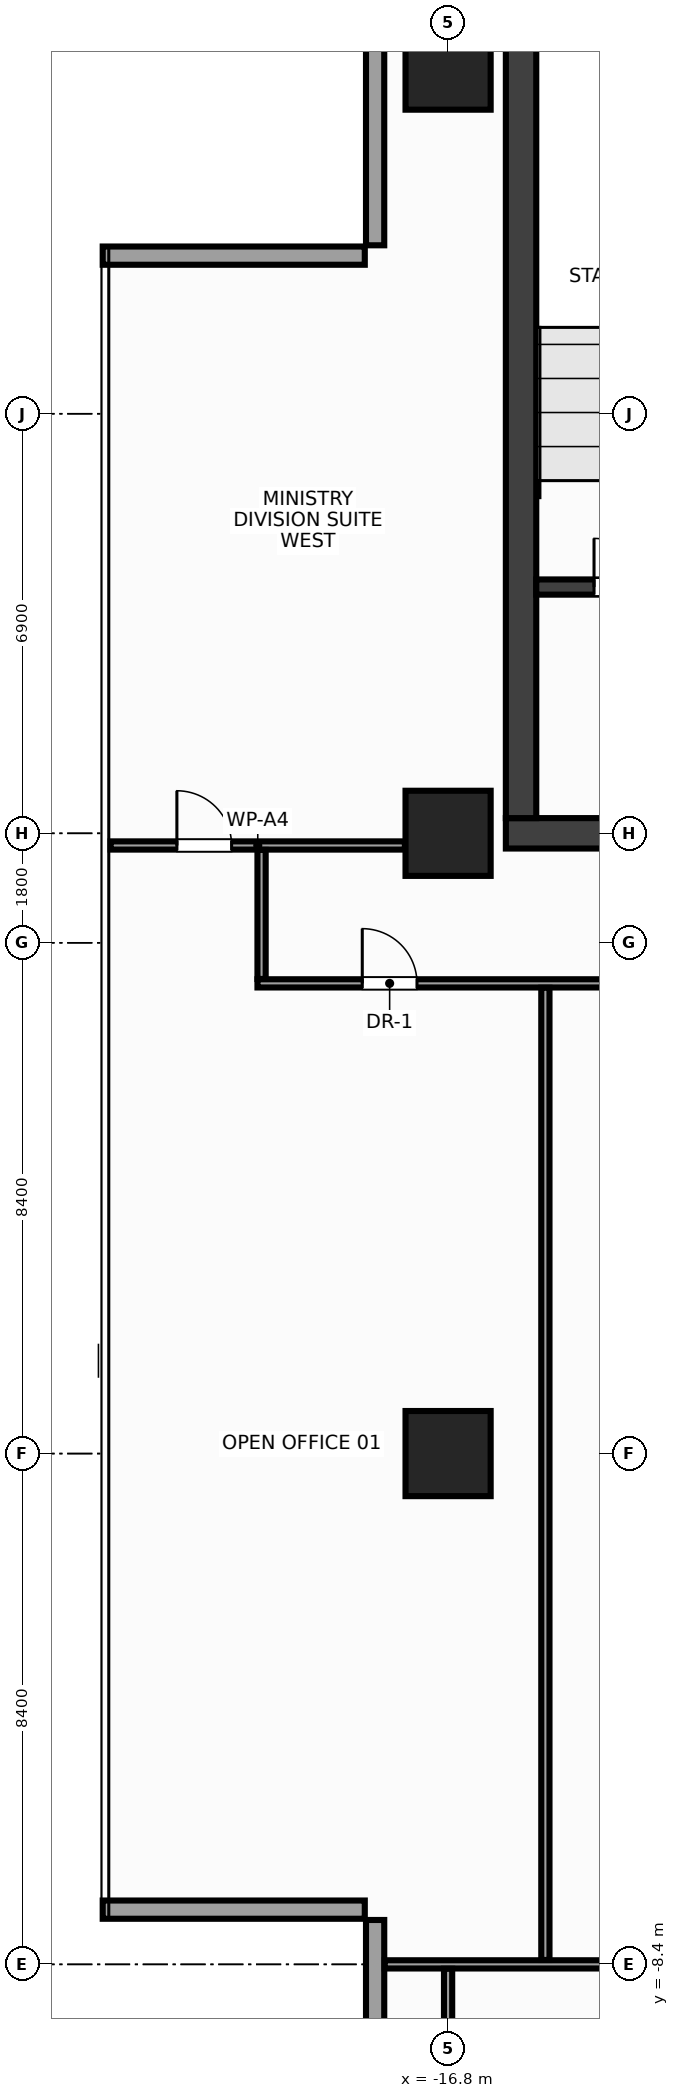
"""IFC4 building model, lengths in metres.
Left out: names, types, materials, properties, quantities, classifications, styles, units other than length and angle.
Written with IfcOpenShell. Run it as: python <this file> out.ifc"""

import sys

from ifc_helpers import new_model, si_unit, direction, frame, frame_2d, origin, origin_2d, place, context, subcontext, project, spatial, rectangle, extrude, source, transform, mapped, element, fill, save


model = new_model("IFC4")
c1 = context("Model", 3, precision=1e-05, world=origin(), true_north=direction((0.0, 1.0)))
c2 = subcontext(c1, "Body", "Model", "MODEL_VIEW")
j1 = project(units=[si_unit("LENGTHUNIT", "METRE"), si_unit("PLANEANGLEUNIT", "RADIAN")], contexts=[c1])
p1 = place(None, origin())
s1 = spatial("IfcSite", under=j1, at=p1, CompositionType="ELEMENT")
p2 = place(p1, origin())
s2 = spatial("IfcBuilding", under=s1, at=p2, CompositionType="ELEMENT")
p3 = place(p2, frame((0.0, 0.0, 239.6)))
s3 = spatial("IfcBuildingStorey", under=s2, at=p3, CompositionType="ELEMENT", Elevation=239.6)
m1 = source(origin(), c2, "Body", "SweptSolid", [
    extrude(rectangle(XDim=31.7, YDim=0.5, at=frame_2d((15.85, 0.0))), origin(), (0.0, 0.0, 1.0), 3.6),
])
p4 = place(p3, frame((-15.85, 10.2, 0.0), z_axis=(0.0, 0.0, 1.0), x_axis=(1.0, 0.0, 0.0)))
e1 = element("IfcWall", 1, at=p4, inside=s3, PredefinedType="SHEAR", context=c2, shape_type="MappedRepresentation", body=[
    mapped(m1, transform((0.0, 0.0, 0.0), x_axis=(1.0, 0.0, 0.0), y_axis=(0.0, 1.0, 0.0), z_axis=(0.0, 0.0, 1.0), scale=1.0)),
])
p5 = place(p4, frame((1.7, 0.0, 0.0)))
e2 = element("IfcOpeningElement", 2, at=p5, cuts=e1, PredefinedType="OPENING", context=c2, shape_type="SweptSolid", body=[
    extrude(rectangle(XDim=1.6, YDim=2.15, at=frame_2d((0.8, 1.075))), frame((0.0, 0.262, 0.0), z_axis=(0.0, -1.0, 0.0), x_axis=(1.0, 0.0, 0.0)), (0.0, 0.0, 1.0), 0.524),
])
p6 = place(p4, frame((28.4, 0.0, 0.0)))
e3 = element("IfcOpeningElement", 3, at=p6, cuts=e1, PredefinedType="OPENING", context=c2, shape_type="SweptSolid", body=[
    extrude(rectangle(XDim=1.6, YDim=2.15, at=frame_2d((0.8, 1.075))), frame((0.0, 0.262, 0.0), z_axis=(0.0, -1.0, 0.0), x_axis=(1.0, 0.0, 0.0)), (0.0, 0.0, 1.0), 0.524),
])
p7 = place(p4, frame((15.1, 0.0, 0.0)))
e4 = element("IfcOpeningElement", 4, at=p7, cuts=e1, PredefinedType="OPENING", context=c2, shape_type="SweptSolid", body=[
    extrude(rectangle(XDim=1.5, YDim=2.2, at=frame_2d((0.75, 1.1))), frame((0.0, 0.262, 0.0), z_axis=(0.0, -1.0, 0.0), x_axis=(1.0, 0.0, 0.0)), (0.0, 0.0, 1.0), 0.524),
])
m2 = source(origin(), c2, "Body", "SweptSolid", [
    extrude(rectangle(XDim=13.1, YDim=0.5, at=frame_2d((6.55, 0.0))), origin(), (0.0, 0.0, 1.0), 3.6),
])
p8 = place(p3, frame((-15.6, 10.45, 0.0), z_axis=(0.0, 0.0, 1.0), x_axis=(0.0, 1.0, 0.0)))
e5 = element("IfcWall", 5, at=p8, inside=s3, PredefinedType="SHEAR", context=c2, shape_type="MappedRepresentation", body=[
    mapped(m2, transform((0.0, 0.0, 0.0), x_axis=(1.0, 0.0, 0.0), y_axis=(0.0, 1.0, 0.0), z_axis=(0.0, 0.0, 1.0), scale=1.0)),
])
m3 = source(origin(), c2, "Body", "SweptSolid", [
    extrude(rectangle(XDim=3.705, YDim=0.25, at=frame_2d((1.853, 0.0))), origin(), (0.0, 0.0, 1.0), 3.6),
])
p9 = place(p3, frame((-15.35, 14.25, 0.0), z_axis=(0.0, 0.0, 1.0), x_axis=(1.0, 0.0, 0.0)))
e6 = element("IfcWall", 6, at=p9, inside=s3, PredefinedType="SHEAR", context=c2, shape_type="MappedRepresentation", body=[
    mapped(m3, transform((0.0, 0.0, 0.0), x_axis=(1.0, 0.0, 0.0), y_axis=(0.0, 1.0, 0.0), z_axis=(0.0, 0.0, 1.0), scale=1.0)),
])
p10 = place(p9, frame((0.95, 0.0, 0.0)))
e7 = element("IfcOpeningElement", 7, at=p10, cuts=e6, PredefinedType="OPENING", context=c2, shape_type="SweptSolid", body=[
    extrude(rectangle(XDim=1.6, YDim=2.15, at=frame_2d((0.8, 1.075))), frame((0.0, 0.137, 0.0), z_axis=(0.0, -1.0, 0.0), x_axis=(1.0, 0.0, 0.0)), (0.0, 0.0, 1.0), 0.274),
])
m4 = source(origin(), c2, "Body", "SweptSolid", [
    extrude(rectangle(XDim=1.4, YDim=1.4, at=origin_2d()), origin(), (0.0, 0.0, 1.0), 3.6),
])
for number, where, z_axis, x_axis in (
    (8, (-16.8, 0.0, 0.0), (0.0, 0.0, 1.0), (1.0, 0.0, 0.0)),
    (9, (-16.8, 10.2, 0.0), (0.0, 0.0, 1.0), (1.0, 0.0, 0.0)),
    (10, (-16.8, 22.8, 0.0), (0.0, 0.0, 1.0), (1.0, 0.0, 0.0)),
):
    element("IfcColumn", number, at=place(p3, frame(where, z_axis=z_axis, x_axis=x_axis)), inside=s3, PredefinedType="COLUMN", context=c2, shape_type="MappedRepresentation", body=[
        mapped(m4, transform((0.0, 0.0, 0.0), x_axis=(1.0, 0.0, 0.0), y_axis=(0.0, 1.0, 0.0), z_axis=(0.0, 0.0, 1.0), scale=1.0)),
    ])
m5 = source(origin(), c2, "Body", "SweptSolid", [
    extrude(rectangle(XDim=4.31, YDim=0.3, at=frame_2d((2.155, 0.0))), origin(), (0.0, 0.0, 1.0), 2.75),
])
p11 = place(p3, frame((-18.0, 24.18, 0.0), z_axis=(0.0, 0.0, 1.0), x_axis=(0.0, -1.0, 0.0)))
e11 = element("IfcWall", 11, at=p11, inside=s3, PredefinedType="STANDARD", context=c2, shape_type="MappedRepresentation", body=[
    mapped(m5, transform((0.0, 0.0, 0.0), x_axis=(1.0, 0.0, 0.0), y_axis=(0.0, 1.0, 0.0), z_axis=(0.0, 0.0, 1.0), scale=1.0)),
])
m6 = source(origin(), c2, "Body", "SweptSolid", [
    extrude(rectangle(XDim=4.31, YDim=0.3, at=frame_2d((2.155, 0.0))), origin(), (0.0, 0.0, 1.0), 2.75),
])
for number, where, z_axis, x_axis in (
    (12, (-18.17, 19.7, 0.0), (0.0, 0.0, 1.0), (-1.0, 0.0, 0.0)),
    (13, (-22.48, -7.5, 0.0), (0.0, 0.0, 1.0), (1.0, 0.0, 0.0)),
    (14, (-18.0, -7.67, 0.0), (0.0, 0.0, 1.0), (0.0, -1.0, 0.0)),
):
    element("IfcWall", number, at=place(p3, frame(where, z_axis=z_axis, x_axis=x_axis)), inside=s3, PredefinedType="STANDARD", context=c2, shape_type="MappedRepresentation", body=[
        mapped(m6, transform((0.0, 0.0, 0.0), x_axis=(1.0, 0.0, 0.0), y_axis=(0.0, 1.0, 0.0), z_axis=(0.0, 0.0, 1.0), scale=1.0)),
    ])
m7 = source(origin(), c2, "Body", "SweptSolid", [
    extrude(rectangle(XDim=4.84, YDim=0.135, at=frame_2d((2.42, 0.0))), origin(), (0.0, 0.0, 1.0), 3.37),
])
p12 = place(p3, frame((-22.35, 10.0, 0.0), z_axis=(0.0, 0.0, 1.0), x_axis=(1.0, 0.0, 0.0)))
e15 = element("IfcWall", 15, at=p12, inside=s3, PredefinedType="PARTITIONING", context=c2, shape_type="MappedRepresentation", body=[
    mapped(m7, transform((0.0, 0.0, 0.0), x_axis=(1.0, 0.0, 0.0), y_axis=(0.0, 1.0, 0.0), z_axis=(0.0, 0.0, 1.0), scale=1.0)),
])
p13 = place(p12, frame((1.09, 0.0, 0.0)))
e16 = element("IfcOpeningElement", 16, at=p13, cuts=e15, PredefinedType="OPENING", context=c2, shape_type="SweptSolid", body=[
    extrude(rectangle(XDim=0.9, YDim=2.15, at=frame_2d((0.45, 1.075))), frame((0.0, 0.08, 0.0), z_axis=(0.0, -1.0, 0.0), x_axis=(1.0, 0.0, 0.0)), (0.0, 0.0, 1.0), 0.159),
])
m8 = source(origin(), c2, "Body", "SweptSolid", [
    extrude(rectangle(XDim=15.6, YDim=0.135, at=frame_2d((7.8, 0.0))), origin(), (0.0, 0.0, 1.0), 2.755),
])
p14 = place(p3, frame((-19.935, 7.732, 0.0), z_axis=(0.0, 0.0, 1.0), x_axis=(1.0, 0.0, 0.0)))
e17 = element("IfcWall", 17, at=p14, inside=s3, PredefinedType="PARTITIONING", context=c2, shape_type="MappedRepresentation", body=[
    mapped(m8, transform((0.0, 0.0, 0.0), x_axis=(1.0, 0.0, 0.0), y_axis=(0.0, 1.0, 0.0), z_axis=(0.0, 0.0, 1.0), scale=1.0)),
])
p15 = place(p14, frame((1.724, 0.0, 0.0)))
e18 = element("IfcOpeningElement", 18, at=p15, cuts=e17, PredefinedType="OPENING", context=c2, shape_type="SweptSolid", body=[
    extrude(rectangle(XDim=0.9, YDim=2.15, at=frame_2d((0.45, 1.075))), frame((0.0, 0.08, 0.0), z_axis=(0.0, -1.0, 0.0), x_axis=(1.0, 0.0, 0.0)), (0.0, 0.0, 1.0), 0.159),
])
p16 = place(p14, frame((9.691, 0.0, 0.0)))
e19 = element("IfcOpeningElement", 19, at=p16, cuts=e17, PredefinedType="OPENING", context=c2, shape_type="SweptSolid", body=[
    extrude(rectangle(XDim=0.9, YDim=2.15, at=frame_2d((0.45, 1.075))), frame((0.0, 0.08, 0.0), z_axis=(0.0, -1.0, 0.0), x_axis=(1.0, 0.0, 0.0)), (0.0, 0.0, 1.0), 0.159),
])
m9 = source(origin(), c2, "Body", "SweptSolid", [
    extrude(rectangle(XDim=2.123, YDim=0.135, at=frame_2d((1.061, 0.0))), origin(), (0.0, 0.0, 1.0), 3.37),
])
p17 = place(p3, frame((-19.867, 7.805, 0.0), z_axis=(0.0, 0.0, 1.0), x_axis=(0.0, 1.0, 0.0)))
e20 = element("IfcWall", 20, at=p17, inside=s3, PredefinedType="PARTITIONING", context=c2, shape_type="MappedRepresentation", body=[
    mapped(m9, transform((0.0, 0.0, 0.0), x_axis=(1.0, 0.0, 0.0), y_axis=(0.0, 1.0, 0.0), z_axis=(0.0, 0.0, 1.0), scale=1.0)),
])
m10 = source(origin(), c2, "Body", "SweptSolid", [
    extrude(rectangle(XDim=35.684, YDim=0.135, at=frame_2d((17.842, 0.0))), origin(), (0.0, 0.0, 1.0), 2.755),
])
p18 = place(p3, frame((-17.842, -8.4, 0.0), z_axis=(0.0, 0.0, 1.0), x_axis=(1.0, 0.0, 0.0)))
e21 = element("IfcWall", 21, at=p18, inside=s3, PredefinedType="PARTITIONING", context=c2, shape_type="MappedRepresentation", body=[
    mapped(m10, transform((0.0, 0.0, 0.0), x_axis=(1.0, 0.0, 0.0), y_axis=(0.0, 1.0, 0.0), z_axis=(0.0, 0.0, 1.0), scale=1.0)),
])
p19 = place(p18, frame((8.892, 0.0, 0.0)))
e22 = element("IfcOpeningElement", 22, at=p19, cuts=e21, PredefinedType="OPENING", context=c2, shape_type="SweptSolid", body=[
    extrude(rectangle(XDim=0.9, YDim=2.15, at=frame_2d((0.45, 1.075))), frame((0.0, 0.08, 0.0), z_axis=(0.0, -1.0, 0.0), x_axis=(1.0, 0.0, 0.0)), (0.0, 0.0, 1.0), 0.159),
])
p20 = place(p18, frame((33.487, 0.0, 0.0)))
e23 = element("IfcOpeningElement", 23, at=p20, cuts=e21, PredefinedType="OPENING", context=c2, shape_type="SweptSolid", body=[
    extrude(rectangle(XDim=0.9, YDim=2.15, at=frame_2d((0.45, 1.075))), frame((0.0, 0.08, 0.0), z_axis=(0.0, -1.0, 0.0), x_axis=(1.0, 0.0, 0.0)), (0.0, 0.0, 1.0), 0.159),
])
p21 = place(p18, frame((4.092, 0.0, 0.0)))
e24 = element("IfcOpeningElement", 24, at=p21, cuts=e21, PredefinedType="OPENING", context=c2, shape_type="SweptSolid", body=[
    extrude(rectangle(XDim=0.9, YDim=2.15, at=frame_2d((0.45, 1.075))), frame((0.0, 0.08, 0.0), z_axis=(0.0, -1.0, 0.0), x_axis=(1.0, 0.0, 0.0)), (0.0, 0.0, 1.0), 0.159),
])
p22 = place(p18, frame((18.692, 0.0, 0.0)))
e25 = element("IfcOpeningElement", 25, at=p22, cuts=e21, PredefinedType="OPENING", context=c2, shape_type="SweptSolid", body=[
    extrude(rectangle(XDim=0.9, YDim=2.15, at=frame_2d((0.45, 1.075))), frame((0.0, 0.08, 0.0), z_axis=(0.0, -1.0, 0.0), x_axis=(1.0, 0.0, 0.0)), (0.0, 0.0, 1.0), 0.159),
])
p23 = place(p18, frame((25.292, 0.0, 0.0)))
e26 = element("IfcOpeningElement", 26, at=p23, cuts=e21, PredefinedType="OPENING", context=c2, shape_type="SweptSolid", body=[
    extrude(rectangle(XDim=0.9, YDim=2.15, at=frame_2d((0.45, 1.075))), frame((0.0, 0.08, 0.0), z_axis=(0.0, -1.0, 0.0), x_axis=(1.0, 0.0, 0.0)), (0.0, 0.0, 1.0), 0.159),
])
m11 = source(origin(), c2, "Body", "SweptSolid", [
    extrude(rectangle(XDim=15.987, YDim=0.135, at=frame_2d((7.994, 0.0))), origin(), (0.0, 0.0, 1.0), 2.655),
])
p24 = place(p3, frame((-15.2, -8.327, 0.0), z_axis=(0.0, 0.0, 1.0), x_axis=(0.0, 1.0, 0.0)))
e27 = element("IfcWall", 27, at=p24, inside=s3, PredefinedType="PARTITIONING", context=c2, shape_type="MappedRepresentation", body=[
    mapped(m11, transform((0.0, 0.0, 0.0), x_axis=(1.0, 0.0, 0.0), y_axis=(0.0, 1.0, 0.0), z_axis=(0.0, 0.0, 1.0), scale=1.0)),
])
m12 = source(origin(), c2, "Body", "SweptSolid", [
    extrude(rectangle(XDim=1.618, YDim=0.135, at=frame_2d((0.809, 0.0))), origin(), (0.0, 0.0, 1.0), 2.755),
])
p25 = place(p3, frame((-16.8, -10.09, 0.0), z_axis=(0.0, 0.0, 1.0), x_axis=(0.0, 1.0, 0.0)))
e28 = element("IfcWall", 28, at=p25, inside=s3, PredefinedType="PARTITIONING", context=c2, shape_type="MappedRepresentation", body=[
    mapped(m12, transform((0.0, 0.0, 0.0), x_axis=(1.0, 0.0, 0.0), y_axis=(0.0, 1.0, 0.0), z_axis=(0.0, 0.0, 1.0), scale=1.0)),
])
m13 = source(origin(), c2, "Body", "SweptSolid", [
    extrude(rectangle(XDim=1.6, YDim=2.15, at=frame_2d((0.8, 1.075))), frame((0.0, 0.025, 0.0), z_axis=(0.0, -1.0, 0.0), x_axis=(1.0, 0.0, 0.0)), (0.0, 0.0, 1.0), 0.05),
])
p26 = place(p10, origin())
e29 = element("IfcDoor", 29, at=p26, inside=s3, OperationType="DOUBLE_DOOR_SINGLE_SWING", PredefinedType="DOOR", context=c2, shape_type="MappedRepresentation", body=[
    mapped(m13, transform((0.0, 0.0, 0.0), x_axis=(1.0, 0.0, 0.0), y_axis=(0.0, 1.0, 0.0), z_axis=(0.0, 0.0, 1.0), scale=1.0)),
])
fill(e7, e29)
m14 = source(origin(), c2, "Body", "SweptSolid", [
    extrude(rectangle(XDim=0.9, YDim=2.15, at=frame_2d((0.45, 1.075))), frame((0.0, 0.025, 0.0), z_axis=(0.0, -1.0, 0.0), x_axis=(1.0, 0.0, 0.0)), (0.0, 0.0, 1.0), 0.05),
])
p27 = place(p15, origin())
e30 = element("IfcDoor", 30, at=p27, inside=s3, OperationType="SINGLE_SWING_LEFT", PredefinedType="DOOR", context=c2, shape_type="MappedRepresentation", body=[
    mapped(m14, transform((0.0, 0.0, 0.0), x_axis=(1.0, 0.0, 0.0), y_axis=(0.0, 1.0, 0.0), z_axis=(0.0, 0.0, 1.0), scale=1.0)),
])
fill(e18, e30)
p28 = place(p13, origin())
e31 = element("IfcDoor", 31, at=p28, inside=s3, OperationType="SINGLE_SWING_LEFT", PredefinedType="DOOR", context=c2, shape_type="MappedRepresentation", body=[
    mapped(m14, transform((0.0, 0.0, 0.0), x_axis=(1.0, 0.0, 0.0), y_axis=(0.0, 1.0, 0.0), z_axis=(0.0, 0.0, 1.0), scale=1.0)),
])
fill(e16, e31)
save(model, sys.argv[1])
